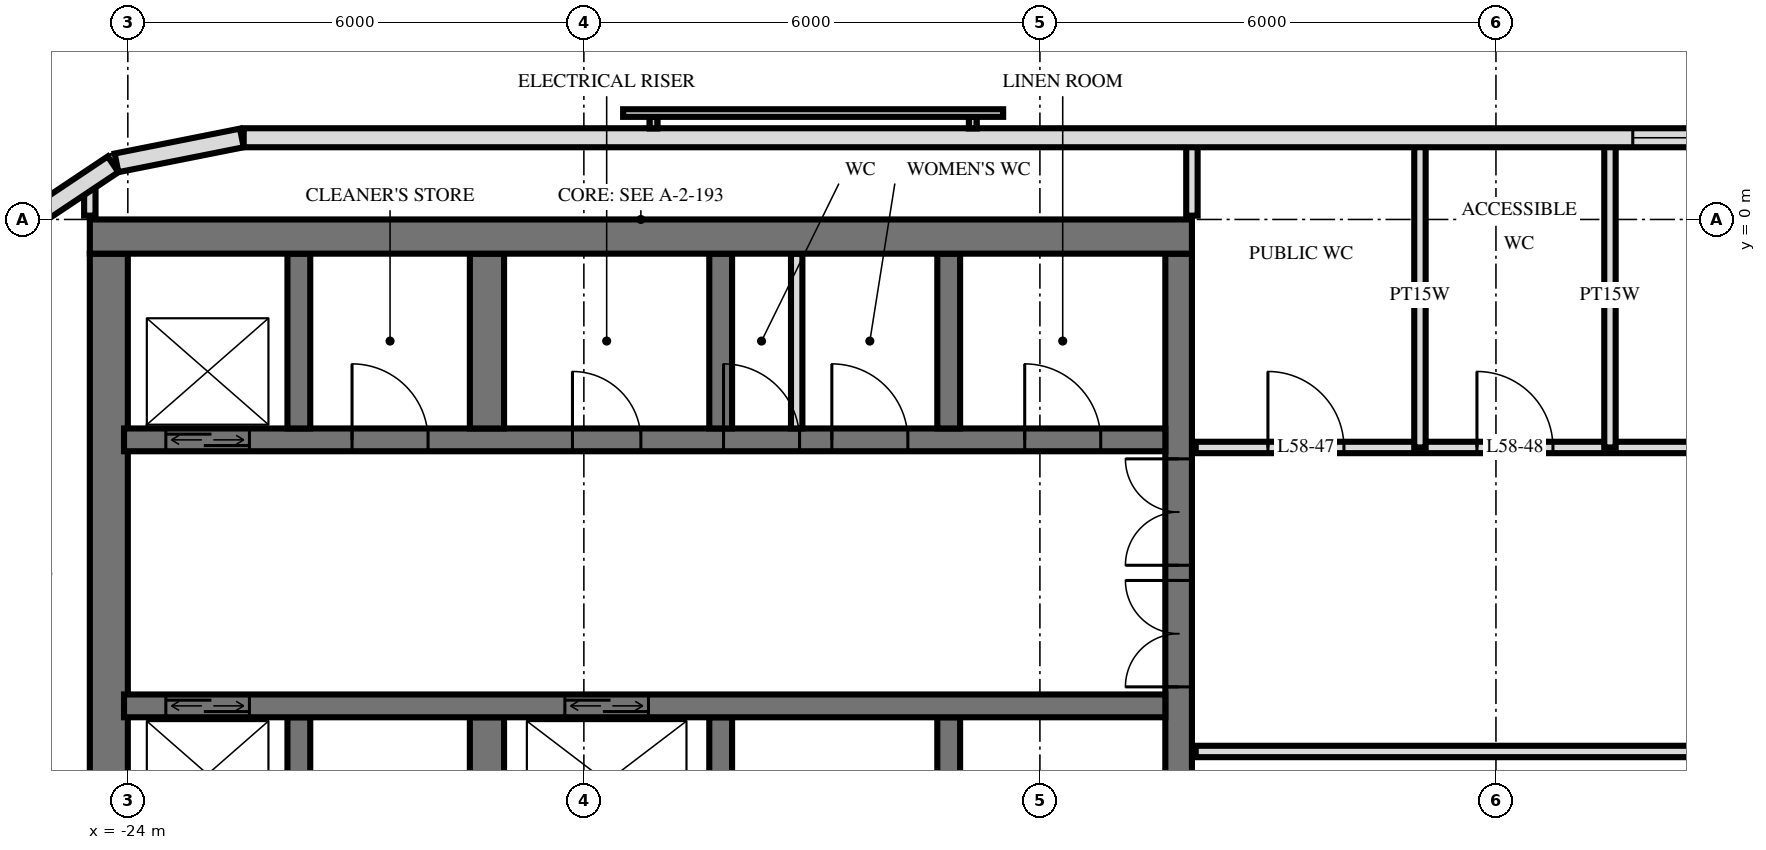
"""IFC4 building model, lengths in metres.
Left out: names, types, materials, properties, quantities, classifications, styles, units other than length and angle.
Written with IfcOpenShell. Run it as: python <this file> out.ifc"""

import sys

from ifc_helpers import new_model, si_unit, direction, frame, frame_2d, origin, place, context, subcontext, project, spatial, rectangle, extrude, element, fill, save


model = new_model("IFC4")
c1 = context("Model", 3, precision=1e-05, world=origin(), true_north=direction((0.0, 1.0)))
c2 = subcontext(c1, "Body", "Model", "MODEL_VIEW")
j1 = project(units=[si_unit("LENGTHUNIT", "METRE"), si_unit("PLANEANGLEUNIT", "RADIAN")], contexts=[c1])
p1 = place(None, origin())
s1 = spatial("IfcSite", under=j1, at=p1, CompositionType="ELEMENT")
p2 = place(p1, origin())
s2 = spatial("IfcBuilding", under=s1, at=p2, CompositionType="ELEMENT")
p3 = place(p2, frame((0.0, 0.0, 222.1)))
s3 = spatial("IfcBuildingStorey", under=s2, at=p3, CompositionType="ELEMENT", Elevation=222.1)
p4 = place(p3, frame((-24.5, -0.225, 0.0), z_axis=(0.0, 0.0, 1.0), x_axis=(1.0, 0.0, 0.0)))
e1 = element("IfcWall", 1, at=p4, inside=s3, PredefinedType="SHEAR", context=c2, shape_type="SweptSolid", body=[
    extrude(rectangle(XDim=14.5, YDim=0.45, at=frame_2d((7.25, 0.0))), origin(), (0.0, 0.0, 1.0), 3.5),
])
p5 = place(p3, frame((-10.175, -14.55, 0.0), z_axis=(0.0, 0.0, 1.0), x_axis=(0.0, 1.0, 0.0)))
e2 = element("IfcWall", 2, at=p5, inside=s3, PredefinedType="SHEAR", context=c2, shape_type="SweptSolid", body=[
    extrude(rectangle(XDim=14.1, YDim=0.35, at=frame_2d((7.05, 0.0))), origin(), (0.0, 0.0, 1.0), 3.5),
])
p6 = place(p5, frame((8.4, 0.0, 0.0)))
e3 = element("IfcOpeningElement", 3, at=p6, cuts=e2, PredefinedType="OPENING", context=c2, shape_type="SweptSolid", body=[
    extrude(rectangle(XDim=1.4, YDim=2.4, at=frame_2d((0.7, 1.2))), frame((0.0, 0.185, 0.0), z_axis=(0.0, -1.0, 0.0), x_axis=(1.0, 0.0, 0.0)), (0.0, 0.0, 1.0), 0.37),
])
p7 = place(p5, frame((10.0, 0.0, 0.0)))
e4 = element("IfcOpeningElement", 4, at=p7, cuts=e2, PredefinedType="OPENING", context=c2, shape_type="SweptSolid", body=[
    extrude(rectangle(XDim=1.4, YDim=2.4, at=frame_2d((0.7, 1.2))), frame((0.0, 0.185, 0.0), z_axis=(0.0, -1.0, 0.0), x_axis=(1.0, 0.0, 0.0)), (0.0, 0.0, 1.0), 0.37),
])
p8 = place(p5, frame((4.0, 0.0, 0.0)))
e5 = element("IfcOpeningElement", 5, at=p8, cuts=e2, PredefinedType="OPENING", context=c2, shape_type="SweptSolid", body=[
    extrude(rectangle(XDim=1.2, YDim=2.1, at=frame_2d((0.6, 1.05))), frame((0.0, 0.185, 0.0), z_axis=(0.0, -1.0, 0.0), x_axis=(1.0, 0.0, 0.0)), (0.0, 0.0, 1.0), 0.37),
])
p9 = place(p3, frame((-24.25, -14.55, 0.0), z_axis=(0.0, 0.0, 1.0), x_axis=(0.0, 1.0, 0.0)))
e6 = element("IfcWall", 6, at=p9, inside=s3, PredefinedType="SHEAR", context=c2, shape_type="SweptSolid", body=[
    extrude(rectangle(XDim=14.1, YDim=0.5, at=frame_2d((7.05, 0.0))), origin(), (0.0, 0.0, 1.0), 3.5),
])
p10 = place(p3, frame((-24.05, -2.9, 0.0), z_axis=(0.0, 0.0, 1.0), x_axis=(1.0, 0.0, 0.0)))
e7 = element("IfcWall", 7, at=p10, inside=s3, PredefinedType="SHEAR", context=c2, shape_type="SweptSolid", body=[
    extrude(rectangle(XDim=13.7, YDim=0.3, at=frame_2d((6.85, 0.0))), origin(), (0.0, 0.0, 1.0), 3.5),
])
p11 = place(p10, frame((0.55, 0.0, 0.0)))
e8 = element("IfcOpeningElement", 8, at=p11, cuts=e7, PredefinedType="OPENING", context=c2, shape_type="SweptSolid", body=[
    extrude(rectangle(XDim=1.1, YDim=2.1, at=frame_2d((0.55, 1.05))), frame((0.0, 0.16, 0.0), z_axis=(0.0, -1.0, 0.0), x_axis=(1.0, 0.0, 0.0)), (0.0, 0.0, 1.0), 0.32),
])
p12 = place(p10, frame((5.9, 0.0, 0.0)))
e9 = element("IfcOpeningElement", 9, at=p12, cuts=e7, PredefinedType="OPENING", context=c2, shape_type="SweptSolid", body=[
    extrude(rectangle(XDim=0.9, YDim=2.1, at=frame_2d((0.45, 1.05))), frame((0.0, 0.16, 0.0), z_axis=(0.0, -1.0, 0.0), x_axis=(1.0, 0.0, 0.0)), (0.0, 0.0, 1.0), 0.32),
])
p13 = place(p10, frame((11.85, 0.0, 0.0)))
e10 = element("IfcOpeningElement", 10, at=p13, cuts=e7, PredefinedType="OPENING", context=c2, shape_type="SweptSolid", body=[
    extrude(rectangle(XDim=1.0, YDim=2.1, at=frame_2d((0.5, 1.05))), frame((0.0, 0.16, 0.0), z_axis=(0.0, -1.0, 0.0), x_axis=(1.0, 0.0, 0.0)), (0.0, 0.0, 1.0), 0.32),
])
p14 = place(p10, frame((9.312, 0.0, 0.0)))
e11 = element("IfcOpeningElement", 11, at=p14, cuts=e7, PredefinedType="OPENING", context=c2, shape_type="SweptSolid", body=[
    extrude(rectangle(XDim=1.0, YDim=2.1, at=frame_2d((0.5, 1.05))), frame((0.0, 0.16, 0.0), z_axis=(0.0, -1.0, 0.0), x_axis=(1.0, 0.0, 0.0)), (0.0, 0.0, 1.0), 0.32),
])
p15 = place(p10, frame((7.887, 0.0, 0.0)))
e12 = element("IfcOpeningElement", 12, at=p15, cuts=e7, PredefinedType="OPENING", context=c2, shape_type="SweptSolid", body=[
    extrude(rectangle(XDim=1.0, YDim=2.1, at=frame_2d((0.5, 1.05))), frame((0.0, 0.16, 0.0), z_axis=(0.0, -1.0, 0.0), x_axis=(1.0, 0.0, 0.0)), (0.0, 0.0, 1.0), 0.32),
])
p16 = place(p10, frame((3.0, 0.0, 0.0)))
e13 = element("IfcOpeningElement", 13, at=p16, cuts=e7, PredefinedType="OPENING", context=c2, shape_type="SweptSolid", body=[
    extrude(rectangle(XDim=1.0, YDim=2.1, at=frame_2d((0.5, 1.05))), frame((0.0, 0.16, 0.0), z_axis=(0.0, -1.0, 0.0), x_axis=(1.0, 0.0, 0.0)), (0.0, 0.0, 1.0), 0.32),
])
p17 = place(p3, frame((-24.05, -6.4, 0.0), z_axis=(0.0, 0.0, 1.0), x_axis=(1.0, 0.0, 0.0)))
e14 = element("IfcWall", 14, at=p17, inside=s3, PredefinedType="SHEAR", context=c2, shape_type="SweptSolid", body=[
    extrude(rectangle(XDim=13.7, YDim=0.3, at=frame_2d((6.85, 0.0))), origin(), (0.0, 0.0, 1.0), 3.5),
])
p18 = place(p17, frame((0.55, 0.0, 0.0)))
e15 = element("IfcOpeningElement", 15, at=p18, cuts=e14, PredefinedType="OPENING", context=c2, shape_type="SweptSolid", body=[
    extrude(rectangle(XDim=1.1, YDim=2.1, at=frame_2d((0.55, 1.05))), frame((0.0, 0.16, 0.0), z_axis=(0.0, -1.0, 0.0), x_axis=(1.0, 0.0, 0.0)), (0.0, 0.0, 1.0), 0.32),
])
p19 = place(p17, frame((5.8, 0.0, 0.0)))
e16 = element("IfcOpeningElement", 16, at=p19, cuts=e14, PredefinedType="OPENING", context=c2, shape_type="SweptSolid", body=[
    extrude(rectangle(XDim=1.1, YDim=2.1, at=frame_2d((0.55, 1.05))), frame((0.0, 0.16, 0.0), z_axis=(0.0, -1.0, 0.0), x_axis=(1.0, 0.0, 0.0)), (0.0, 0.0, 1.0), 0.32),
])
for number, where, z_axis, x_axis in (
    (17, (-13.2, -2.75, 0.0), (0.0, 0.0, 1.0), (0.0, 1.0, 0.0)),
    (18, (-13.2, -8.85, 0.0), (0.0, 0.0, 1.0), (0.0, 1.0, 0.0)),
    (19, (-16.2, -2.75, 0.0), (0.0, 0.0, 1.0), (0.0, 1.0, 0.0)),
    (20, (-16.2, -8.85, 0.0), (0.0, 0.0, 1.0), (0.0, 1.0, 0.0)),
):
    element("IfcWall", number, at=place(p3, frame(where, z_axis=z_axis, x_axis=x_axis)), inside=s3, PredefinedType="SHEAR", context=c2, shape_type="SweptSolid", body=[
        extrude(rectangle(XDim=2.3, YDim=0.3, at=frame_2d((1.15, 0.0))), origin(), (0.0, 0.0, 1.0), 3.5),
    ])
for number, where, z_axis, x_axis in (
    (21, (-19.275, -2.75, 0.0), (0.0, 0.0, 1.0), (0.0, 1.0, 0.0)),
    (22, (-19.275, -8.85, 0.0), (0.0, 0.0, 1.0), (0.0, 1.0, 0.0)),
):
    element("IfcWall", number, at=place(p3, frame(where, z_axis=z_axis, x_axis=x_axis)), inside=s3, PredefinedType="SHEAR", context=c2, shape_type="SweptSolid", body=[
        extrude(rectangle(XDim=2.3, YDim=0.45, at=frame_2d((1.15, 0.0))), origin(), (0.0, 0.0, 1.0), 3.5),
    ])
for number, where, z_axis, x_axis in (
    (23, (-21.75, -2.75, 0.0), (0.0, 0.0, 1.0), (0.0, 1.0, 0.0)),
    (24, (-21.75, -8.85, 0.0), (0.0, 0.0, 1.0), (0.0, 1.0, 0.0)),
):
    element("IfcWall", number, at=place(p3, frame(where, z_axis=z_axis, x_axis=x_axis)), inside=s3, PredefinedType="SHEAR", context=c2, shape_type="SweptSolid", body=[
        extrude(rectangle(XDim=2.3, YDim=0.3, at=frame_2d((1.15, 0.0))), origin(), (0.0, 0.0, 1.0), 3.5),
    ])
p20 = place(p3, frame((22.475, 1.075, 0.0), z_axis=(0.0, 0.0, 1.0), x_axis=(-1.0, 0.0, 0.0)))
e25 = element("IfcWall", 25, at=p20, inside=s3, PredefinedType="SOLIDWALL", context=c2, shape_type="SweptSolid", body=[
    extrude(rectangle(XDim=44.951, YDim=0.25, at=frame_2d((22.475, 0.0))), origin(), (0.0, 0.0, 1.0), 3.22),
])
p21 = place(p20, frame((15.275, 0.0, 0.9)))
e26 = element("IfcOpeningElement", 26, at=p21, cuts=e25, PredefinedType="OPENING", context=c2, shape_type="SweptSolid", body=[
    extrude(rectangle(XDim=2.4, YDim=1.5, at=frame_2d((1.2, 0.75))), frame((0.0, 0.135, 0.0), z_axis=(0.0, -1.0, 0.0), x_axis=(1.0, 0.0, 0.0)), (0.0, 0.0, 1.0), 0.27),
])
p22 = place(p20, frame((18.275, 0.0, 0.9)))
e27 = element("IfcOpeningElement", 27, at=p22, cuts=e25, PredefinedType="OPENING", context=c2, shape_type="SweptSolid", body=[
    extrude(rectangle(XDim=2.4, YDim=1.5, at=frame_2d((1.2, 0.75))), frame((0.0, 0.135, 0.0), z_axis=(0.0, -1.0, 0.0), x_axis=(1.0, 0.0, 0.0)), (0.0, 0.0, 1.0), 0.27),
])
p23 = place(p20, frame((21.275, 0.0, 0.9)))
e28 = element("IfcOpeningElement", 28, at=p23, cuts=e25, PredefinedType="OPENING", context=c2, shape_type="SweptSolid", body=[
    extrude(rectangle(XDim=2.4, YDim=1.5, at=frame_2d((1.2, 0.75))), frame((0.0, 0.135, 0.0), z_axis=(0.0, -1.0, 0.0), x_axis=(1.0, 0.0, 0.0)), (0.0, 0.0, 1.0), 0.27),
])
p24 = place(p20, frame((24.275, 0.0, 0.9)))
e29 = element("IfcOpeningElement", 29, at=p24, cuts=e25, PredefinedType="OPENING", context=c2, shape_type="SweptSolid", body=[
    extrude(rectangle(XDim=2.4, YDim=1.5, at=frame_2d((1.2, 0.75))), frame((0.0, 0.135, 0.0), z_axis=(0.0, -1.0, 0.0), x_axis=(1.0, 0.0, 0.0)), (0.0, 0.0, 1.0), 0.27),
])
p25 = place(p3, frame((-22.5, 1.073, 0.0), z_axis=(0.0, 0.0, 1.0), x_axis=(-0.980803419081, -0.194999110559, 0.0)))
e30 = element("IfcWall", 30, at=p25, inside=s3, PredefinedType="SOLIDWALL", context=c2, shape_type="SweptSolid", body=[
    extrude(rectangle(XDim=1.681, YDim=0.25, at=frame_2d((0.841, 0.0))), origin(), (0.0, 0.0, 1.0), 3.22),
])
p26 = place(p3, frame((-24.194, 0.726, 0.0), z_axis=(0.0, 0.0, 1.0), x_axis=(-0.831482937015, -0.55555029066, 0.0)))
e31 = element("IfcWall", 31, at=p26, inside=s3, PredefinedType="SOLIDWALL", context=c2, shape_type="SweptSolid", body=[
    extrude(rectangle(XDim=1.656, YDim=0.25, at=frame_2d((0.828, 0.0))), origin(), (0.0, 0.0, 1.0), 3.22),
])
p27 = place(p3, frame((-15.2, -2.75, 0.0), z_axis=(0.0, 0.0, 1.0), x_axis=(0.0, 1.0, 0.0)))
e32 = element("IfcWall", 32, at=p27, inside=s3, PredefinedType="PARTITIONING", context=c2, shape_type="SweptSolid", body=[
    extrude(rectangle(XDim=2.3, YDim=0.15, at=frame_2d((1.15, 0.0))), origin(), (0.0, 0.0, 1.0), 3.2),
])
for number, where, z_axis, x_axis in (
    (33, (-4.5, -3.0, 0.0), (0.0, 0.0, 1.0), (0.0, 1.0, 0.0)),
    (34, (-7.0, -3.0, 0.0), (0.0, 0.0, 1.0), (0.0, 1.0, 0.0)),
):
    element("IfcWall", number, at=place(p3, frame(where, z_axis=z_axis, x_axis=x_axis)), inside=s3, PredefinedType="PLUMBINGWALL", context=c2, shape_type="SweptSolid", body=[
        extrude(rectangle(XDim=4.02, YDim=0.15, at=frame_2d((2.01, 0.0))), origin(), (0.0, 0.0, 1.0), 3.22),
    ])
p28 = place(p3, frame((-10.0, 0.05, 0.0), z_axis=(0.0, 0.0, 1.0), x_axis=(0.0, 1.0, 0.0)))
e35 = element("IfcWall", 35, at=p28, inside=s3, PredefinedType="PLUMBINGWALL", context=c2, shape_type="SweptSolid", body=[
    extrude(rectangle(XDim=0.97, YDim=0.15, at=frame_2d((0.485, 0.0))), origin(), (0.0, 0.0, 1.0), 3.22),
])
p29 = place(p3, frame((-24.5, 0.05, 0.0), z_axis=(0.0, 0.0, 1.0), x_axis=(0.0, 1.0, 0.0)))
e36 = element("IfcWall", 36, at=p29, inside=s3, PredefinedType="PARTITIONING", context=c2, shape_type="SweptSolid", body=[
    extrude(rectangle(XDim=0.405, YDim=0.15, at=frame_2d((0.203, 0.0))), origin(), (0.0, 0.0, 1.0), 3.22),
])
p30 = place(p3, frame((-9.95, -7.0, 0.0), z_axis=(0.0, 0.0, 1.0), x_axis=(1.0, 0.0, 0.0)))
e37 = element("IfcWall", 37, at=p30, inside=s3, PredefinedType="PARTITIONING", context=c2, shape_type="SweptSolid", body=[
    extrude(rectangle(XDim=19.9, YDim=0.15, at=frame_2d((9.95, 0.0))), origin(), (0.0, 0.0, 1.0), 3.22),
])
p31 = place(p30, frame((9.45, 0.0, 0.0)))
e38 = element("IfcOpeningElement", 38, at=p31, cuts=e37, PredefinedType="OPENING", context=c2, shape_type="SweptSolid", body=[
    extrude(rectangle(XDim=1.0, YDim=2.1, at=frame_2d((0.5, 1.05))), frame((0.0, 0.085, 0.0), z_axis=(0.0, -1.0, 0.0), x_axis=(1.0, 0.0, 0.0)), (0.0, 0.0, 1.0), 0.17),
])
p32 = place(p30, frame((15.45, 0.0, 0.0)))
e39 = element("IfcOpeningElement", 39, at=p32, cuts=e37, PredefinedType="OPENING", context=c2, shape_type="SweptSolid", body=[
    extrude(rectangle(XDim=1.0, YDim=2.1, at=frame_2d((0.5, 1.05))), frame((0.0, 0.085, 0.0), z_axis=(0.0, -1.0, 0.0), x_axis=(1.0, 0.0, 0.0)), (0.0, 0.0, 1.0), 0.17),
])
p33 = place(p3, frame((-9.95, -3.0, 0.0), z_axis=(0.0, 0.0, 1.0), x_axis=(1.0, 0.0, 0.0)))
e40 = element("IfcWall", 40, at=p33, inside=s3, PredefinedType="PARTITIONING", context=c2, shape_type="SweptSolid", body=[
    extrude(rectangle(XDim=19.9, YDim=0.15, at=frame_2d((9.95, 0.0))), origin(), (0.0, 0.0, 1.0), 3.22),
])
p34 = place(p33, frame((0.95, 0.0, 0.0)))
e41 = element("IfcOpeningElement", 41, at=p34, cuts=e40, PredefinedType="OPENING", context=c2, shape_type="SweptSolid", body=[
    extrude(rectangle(XDim=1.0, YDim=2.1, at=frame_2d((0.5, 1.05))), frame((0.0, 0.085, 0.0), z_axis=(0.0, -1.0, 0.0), x_axis=(1.0, 0.0, 0.0)), (0.0, 0.0, 1.0), 0.17),
])
p35 = place(p33, frame((3.7, 0.0, 0.0)))
e42 = element("IfcOpeningElement", 42, at=p35, cuts=e40, PredefinedType="OPENING", context=c2, shape_type="SweptSolid", body=[
    extrude(rectangle(XDim=1.0, YDim=2.1, at=frame_2d((0.5, 1.05))), frame((0.0, 0.085, 0.0), z_axis=(0.0, -1.0, 0.0), x_axis=(1.0, 0.0, 0.0)), (0.0, 0.0, 1.0), 0.17),
])
p36 = place(p33, frame((7.95, 0.0, 0.0)))
e43 = element("IfcOpeningElement", 43, at=p36, cuts=e40, PredefinedType="OPENING", context=c2, shape_type="SweptSolid", body=[
    extrude(rectangle(XDim=1.0, YDim=2.1, at=frame_2d((0.5, 1.05))), frame((0.0, 0.085, 0.0), z_axis=(0.0, -1.0, 0.0), x_axis=(1.0, 0.0, 0.0)), (0.0, 0.0, 1.0), 0.17),
])
p37 = place(p33, frame((15.2, 0.0, 0.0)))
e44 = element("IfcOpeningElement", 44, at=p37, cuts=e40, PredefinedType="OPENING", context=c2, shape_type="SweptSolid", body=[
    extrude(rectangle(XDim=1.0, YDim=2.1, at=frame_2d((0.5, 1.05))), frame((0.0, 0.085, 0.0), z_axis=(0.0, -1.0, 0.0), x_axis=(1.0, 0.0, 0.0)), (0.0, 0.0, 1.0), 0.17),
])
p38 = place(p24, origin())
e45 = element("IfcWindow", 45, at=p38, inside=s3, PartitioningType="SINGLE_PANEL", PredefinedType="WINDOW", context=c2, shape_type="SweptSolid", body=[
    extrude(rectangle(XDim=2.4, YDim=1.5, at=frame_2d((1.2, 0.75))), frame((0.0, 0.03, 0.0), z_axis=(0.0, -1.0, 0.0), x_axis=(1.0, 0.0, 0.0)), (0.0, 0.0, 1.0), 0.06),
])
fill(e29, e45)
p39 = place(p11, origin())
e46 = element("IfcDoor", 46, at=p39, inside=s3, OperationType="DOUBLE_DOOR_SLIDING", PredefinedType="USERDEFINED", context=c2, shape_type="SweptSolid", body=[
    extrude(rectangle(XDim=1.1, YDim=2.1, at=frame_2d((0.55, 1.05))), frame((0.0, 0.025, 0.0), z_axis=(0.0, -1.0, 0.0), x_axis=(1.0, 0.0, 0.0)), (0.0, 0.0, 1.0), 0.05),
])
fill(e8, e46)
p40 = place(p18, origin())
e47 = element("IfcDoor", 47, at=p40, inside=s3, OperationType="DOUBLE_DOOR_SLIDING", PredefinedType="USERDEFINED", context=c2, shape_type="SweptSolid", body=[
    extrude(rectangle(XDim=1.1, YDim=2.1, at=frame_2d((0.55, 1.05))), frame((0.0, 0.025, 0.0), z_axis=(0.0, -1.0, 0.0), x_axis=(1.0, 0.0, 0.0)), (0.0, 0.0, 1.0), 0.05),
])
fill(e15, e47)
p41 = place(p19, origin())
e48 = element("IfcDoor", 48, at=p41, inside=s3, OperationType="DOUBLE_DOOR_SLIDING", PredefinedType="USERDEFINED", context=c2, shape_type="SweptSolid", body=[
    extrude(rectangle(XDim=1.1, YDim=2.1, at=frame_2d((0.55, 1.05))), frame((0.0, 0.025, 0.0), z_axis=(0.0, -1.0, 0.0), x_axis=(1.0, 0.0, 0.0)), (0.0, 0.0, 1.0), 0.05),
])
fill(e16, e48)
p42 = place(p6, origin())
e49 = element("IfcDoor", 49, at=p42, inside=s3, OperationType="DOUBLE_DOOR_SINGLE_SWING", PredefinedType="DOOR", context=c2, shape_type="SweptSolid", body=[
    extrude(rectangle(XDim=1.4, YDim=2.4, at=frame_2d((0.7, 1.2))), frame((0.0, 0.025, 0.0), z_axis=(0.0, -1.0, 0.0), x_axis=(1.0, 0.0, 0.0)), (0.0, 0.0, 1.0), 0.05),
])
fill(e3, e49)
p43 = place(p7, origin())
e50 = element("IfcDoor", 50, at=p43, inside=s3, OperationType="DOUBLE_DOOR_SINGLE_SWING", PredefinedType="DOOR", context=c2, shape_type="SweptSolid", body=[
    extrude(rectangle(XDim=1.4, YDim=2.4, at=frame_2d((0.7, 1.2))), frame((0.0, 0.025, 0.0), z_axis=(0.0, -1.0, 0.0), x_axis=(1.0, 0.0, 0.0)), (0.0, 0.0, 1.0), 0.05),
])
fill(e4, e50)
p44 = place(p12, origin())
e51 = element("IfcDoor", 51, at=p44, inside=s3, OperationType="SINGLE_SWING_RIGHT", PredefinedType="DOOR", context=c2, shape_type="SweptSolid", body=[
    extrude(rectangle(XDim=0.9, YDim=2.1, at=frame_2d((0.45, 1.05))), frame((0.0, 0.025, 0.0), z_axis=(0.0, -1.0, 0.0), x_axis=(1.0, 0.0, 0.0)), (0.0, 0.0, 1.0), 0.05),
])
fill(e9, e51)
p45 = place(p13, origin())
e52 = element("IfcDoor", 52, at=p45, inside=s3, OperationType="SINGLE_SWING_RIGHT", PredefinedType="DOOR", context=c2, shape_type="SweptSolid", body=[
    extrude(rectangle(XDim=1.0, YDim=2.1, at=frame_2d((0.5, 1.05))), frame((0.0, 0.025, 0.0), z_axis=(0.0, -1.0, 0.0), x_axis=(1.0, 0.0, 0.0)), (0.0, 0.0, 1.0), 0.05),
])
fill(e10, e52)
p46 = place(p14, origin())
e53 = element("IfcDoor", 53, at=p46, inside=s3, OperationType="SINGLE_SWING_RIGHT", PredefinedType="DOOR", context=c2, shape_type="SweptSolid", body=[
    extrude(rectangle(XDim=1.0, YDim=2.1, at=frame_2d((0.5, 1.05))), frame((0.0, 0.025, 0.0), z_axis=(0.0, -1.0, 0.0), x_axis=(1.0, 0.0, 0.0)), (0.0, 0.0, 1.0), 0.05),
])
fill(e11, e53)
p47 = place(p15, origin())
e54 = element("IfcDoor", 54, at=p47, inside=s3, OperationType="SINGLE_SWING_RIGHT", PredefinedType="DOOR", context=c2, shape_type="SweptSolid", body=[
    extrude(rectangle(XDim=1.0, YDim=2.1, at=frame_2d((0.5, 1.05))), frame((0.0, 0.025, 0.0), z_axis=(0.0, -1.0, 0.0), x_axis=(1.0, 0.0, 0.0)), (0.0, 0.0, 1.0), 0.05),
])
fill(e12, e54)
p48 = place(p16, origin())
e55 = element("IfcDoor", 55, at=p48, inside=s3, OperationType="SINGLE_SWING_RIGHT", PredefinedType="DOOR", context=c2, shape_type="SweptSolid", body=[
    extrude(rectangle(XDim=1.0, YDim=2.1, at=frame_2d((0.5, 1.05))), frame((0.0, 0.025, 0.0), z_axis=(0.0, -1.0, 0.0), x_axis=(1.0, 0.0, 0.0)), (0.0, 0.0, 1.0), 0.05),
])
fill(e13, e55)
p49 = place(p34, origin())
e56 = element("IfcDoor", 56, at=p49, inside=s3, OperationType="SINGLE_SWING_RIGHT", PredefinedType="DOOR", context=c2, shape_type="SweptSolid", body=[
    extrude(rectangle(XDim=1.0, YDim=2.1, at=frame_2d((0.5, 1.05))), frame((0.0, 0.025, 0.0), z_axis=(0.0, -1.0, 0.0), x_axis=(1.0, 0.0, 0.0)), (0.0, 0.0, 1.0), 0.05),
])
fill(e41, e56)
p50 = place(p35, origin())
e57 = element("IfcDoor", 57, at=p50, inside=s3, OperationType="SINGLE_SWING_RIGHT", PredefinedType="DOOR", context=c2, shape_type="SweptSolid", body=[
    extrude(rectangle(XDim=1.0, YDim=2.1, at=frame_2d((0.5, 1.05))), frame((0.0, 0.025, 0.0), z_axis=(0.0, -1.0, 0.0), x_axis=(1.0, 0.0, 0.0)), (0.0, 0.0, 1.0), 0.05),
])
fill(e42, e57)
save(model, sys.argv[1])
